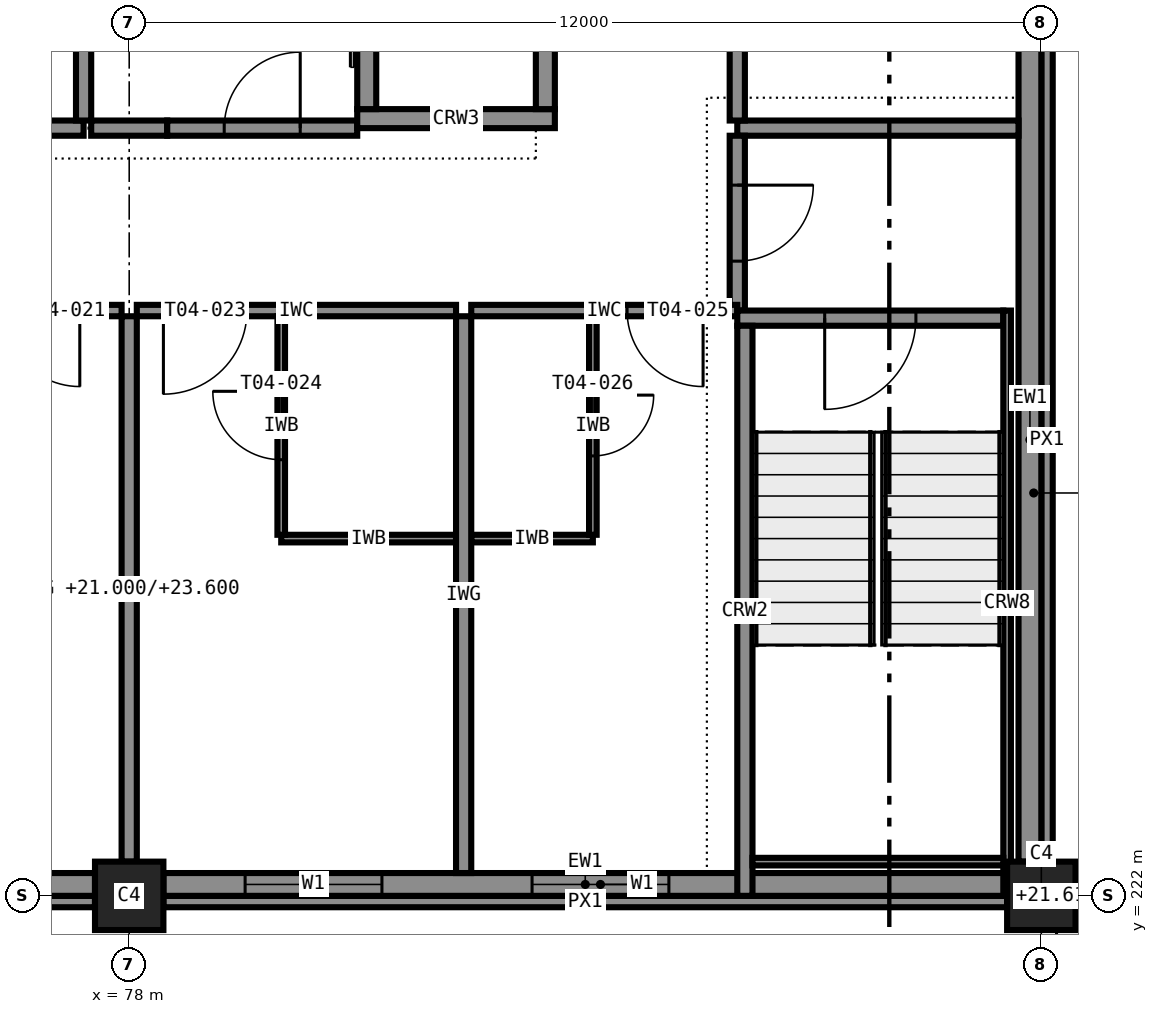
"""IFC4 building model, lengths in metres.
Left out: names, types, materials, properties, quantities, classifications, styles, units other than length and angle.
Written with IfcOpenShell. Run it as: python <this file> out.ifc"""

import sys

from ifc_helpers import new_model, si_unit, direction, frame, frame_2d, origin, origin_2d, place, context, subcontext, project, spatial, rectangle, extrude, element, fill, save


model = new_model("IFC4")
c1 = context("Model", 3, precision=1e-05, world=origin(), true_north=direction((0.0, 1.0)))
c2 = subcontext(c1, "Body", "Model", "MODEL_VIEW")
j1 = project(units=[si_unit("LENGTHUNIT", "METRE"), si_unit("PLANEANGLEUNIT", "RADIAN")], contexts=[c1])
p1 = place(None, origin())
s1 = spatial("IfcSite", under=j1, at=p1, CompositionType="ELEMENT")
p2 = place(p1, origin())
s2 = spatial("IfcBuilding", under=s1, at=p2, CompositionType="ELEMENT")
p3 = place(p2, frame((0.0, 0.0, 21.0)))
s3 = spatial("IfcBuildingStorey", under=s2, at=p3, CompositionType="ELEMENT", Elevation=21.0)
for number, where, z_axis, x_axis in (
    (1, (78.0, 222.0, 0.0), (0.0, 0.0, 1.0), (1.0, 0.0, 0.0)),
    (2, (90.0, 222.0, 0.0), (0.0, 0.0, 1.0), (1.0, 0.0, 0.0)),
):
    element("IfcColumn", number, at=place(p3, frame(where, z_axis=z_axis, x_axis=x_axis)), inside=s3, PredefinedType="COLUMN", context=c2, shape_type="SweptSolid", body=[
        extrude(rectangle(XDim=0.9, YDim=0.9, at=origin_2d()), origin(), (0.0, 0.0, 1.0), 3.6),
    ])
p4 = place(p3, frame((81.0, 232.225, 0.0), z_axis=(0.0, 0.0, 1.0), x_axis=(1.0, 0.0, 0.0)))
e3 = element("IfcWall", 3, at=p4, inside=s3, PredefinedType="SHEAR", context=c2, shape_type="SweptSolid", body=[
    extrude(rectangle(XDim=2.6, YDim=0.25, at=frame_2d((1.3, 0.0))), origin(), (0.0, 0.0, 1.0), 3.6),
])
p5 = place(p3, frame((81.125, 232.35, 0.0), z_axis=(0.0, 0.0, 1.0), x_axis=(0.0, 1.0, 0.0)))
e4 = element("IfcWall", 4, at=p5, inside=s3, PredefinedType="SHEAR", context=c2, shape_type="SweptSolid", body=[
    extrude(rectangle(XDim=3.3, YDim=0.25, at=frame_2d((1.65, 0.0))), origin(), (0.0, 0.0, 1.0), 3.6),
])
p6 = place(p5, frame((1.1, 0.0, 0.0)))
e5 = element("IfcOpeningElement", 5, at=p6, cuts=e4, PredefinedType="OPENING", context=c2, shape_type="SweptSolid", body=[
    extrude(rectangle(XDim=1.1, YDim=2.1, at=frame_2d((0.55, 1.05))), frame((0.0, 0.135, 0.0), z_axis=(0.0, -1.0, 0.0), x_axis=(1.0, 0.0, 0.0)), (0.0, 0.0, 1.0), 0.27),
])
p7 = place(p3, frame((83.475, 232.35, 0.0), z_axis=(0.0, 0.0, 1.0), x_axis=(0.0, 1.0, 0.0)))
e6 = element("IfcWall", 6, at=p7, inside=s3, PredefinedType="SHEAR", context=c2, shape_type="SweptSolid", body=[
    extrude(rectangle(XDim=3.3, YDim=0.25, at=frame_2d((1.65, 0.0))), origin(), (0.0, 0.0, 1.0), 3.6),
])
p8 = place(p3, frame((89.5, 229.6, 0.0), z_axis=(0.0, 0.0, 1.0), x_axis=(-1.0, 0.0, 0.0)))
e7 = element("IfcWall", 7, at=p8, inside=s3, PredefinedType="SHEAR", context=c2, shape_type="SweptSolid", body=[
    extrude(rectangle(XDim=3.5, YDim=0.2, at=frame_2d((1.75, 0.0))), origin(), (0.0, 0.0, 1.0), 3.6),
])
p9 = place(p8, frame((1.15, 0.0, 0.0)))
e8 = element("IfcOpeningElement", 8, at=p9, cuts=e7, PredefinedType="OPENING", context=c2, shape_type="SweptSolid", body=[
    extrude(rectangle(XDim=1.2, YDim=2.1, at=frame_2d((0.6, 1.05))), frame((0.0, 0.11, 0.0), z_axis=(0.0, -1.0, 0.0), x_axis=(1.0, 0.0, 0.0)), (0.0, 0.0, 1.0), 0.22),
])
p10 = place(p3, frame((86.1, 222.0, 0.0), z_axis=(0.0, 0.0, 1.0), x_axis=(0.0, 1.0, 0.0)))
e9 = element("IfcWall", 9, at=p10, inside=s3, PredefinedType="SHEAR", context=c2, shape_type="SweptSolid", body=[
    extrude(rectangle(XDim=7.5, YDim=0.2, at=frame_2d((3.75, 0.0))), origin(), (0.0, 0.0, 1.0), 3.6),
])
p11 = place(p3, frame((89.55, 229.7, 0.0), z_axis=(0.0, 0.0, 1.0), x_axis=(0.0, -1.0, 0.0)))
e10 = element("IfcWall", 10, at=p11, inside=s3, PredefinedType="SHEAR", context=c2, shape_type="SweptSolid", body=[
    extrude(rectangle(XDim=7.7, YDim=0.1, at=frame_2d((3.85, 0.0))), origin(), (0.0, 0.0, 1.0), 3.4),
])
p12 = place(p3, frame((89.5, 222.45, 0.0), z_axis=(0.0, 0.0, 1.0), x_axis=(-1.0, 0.0, 0.0)))
e11 = element("IfcWall", 11, at=p12, inside=s3, PredefinedType="SHEAR", context=c2, shape_type="SweptSolid", body=[
    extrude(rectangle(XDim=3.3, YDim=0.1, at=frame_2d((1.65, 0.0))), origin(), (0.0, 0.0, 1.0), 3.4),
])
p13 = place(p3, frame((66.45, 222.15, 0.0), z_axis=(0.0, 0.0, 1.0), x_axis=(1.0, 0.0, 0.0)))
e12 = element("IfcWall", 12, at=p13, inside=s3, PredefinedType="STANDARD", context=c2, shape_type="SweptSolid", body=[
    extrude(rectangle(XDim=11.1, YDim=0.3, at=frame_2d((5.55, 0.0))), origin(), (0.0, 0.0, 1.0), 2.6),
])
p14 = place(p13, frame((0.875, 0.0, 0.85)))
e13 = element("IfcOpeningElement", 13, at=p14, cuts=e12, PredefinedType="OPENING", context=c2, shape_type="SweptSolid", body=[
    extrude(rectangle(XDim=1.8, YDim=1.75, at=frame_2d((0.9, 0.875))), frame((0.0, 0.16, 0.0), z_axis=(0.0, -1.0, 0.0), x_axis=(1.0, 0.0, 0.0)), (0.0, 0.0, 1.0), 0.32),
])
p15 = place(p13, frame((4.65, 0.0, 0.85)))
e14 = element("IfcOpeningElement", 14, at=p15, cuts=e12, PredefinedType="OPENING", context=c2, shape_type="SweptSolid", body=[
    extrude(rectangle(XDim=1.8, YDim=1.75, at=frame_2d((0.9, 0.875))), frame((0.0, 0.16, 0.0), z_axis=(0.0, -1.0, 0.0), x_axis=(1.0, 0.0, 0.0)), (0.0, 0.0, 1.0), 0.32),
])
p16 = place(p13, frame((8.425, 0.0, 0.85)))
e15 = element("IfcOpeningElement", 15, at=p16, cuts=e12, PredefinedType="OPENING", context=c2, shape_type="SweptSolid", body=[
    extrude(rectangle(XDim=1.8, YDim=1.75, at=frame_2d((0.9, 0.875))), frame((0.0, 0.16, 0.0), z_axis=(0.0, -1.0, 0.0), x_axis=(1.0, 0.0, 0.0)), (0.0, 0.0, 1.0), 0.32),
])
p17 = place(p3, frame((78.45, 222.15, 0.0), z_axis=(0.0, 0.0, 1.0), x_axis=(1.0, 0.0, 0.0)))
e16 = element("IfcWall", 16, at=p17, inside=s3, PredefinedType="STANDARD", context=c2, shape_type="SweptSolid", body=[
    extrude(rectangle(XDim=11.1, YDim=0.3, at=frame_2d((5.55, 0.0))), origin(), (0.0, 0.0, 1.0), 2.6),
])
p18 = place(p17, frame((1.075, 0.0, 0.85)))
e17 = element("IfcOpeningElement", 17, at=p18, cuts=e16, PredefinedType="OPENING", context=c2, shape_type="SweptSolid", body=[
    extrude(rectangle(XDim=1.8, YDim=1.75, at=frame_2d((0.9, 0.875))), frame((0.0, 0.16, 0.0), z_axis=(0.0, -1.0, 0.0), x_axis=(1.0, 0.0, 0.0)), (0.0, 0.0, 1.0), 0.32),
])
p19 = place(p17, frame((4.85, 0.0, 0.85)))
e18 = element("IfcOpeningElement", 18, at=p19, cuts=e16, PredefinedType="OPENING", context=c2, shape_type="SweptSolid", body=[
    extrude(rectangle(XDim=1.8, YDim=1.75, at=frame_2d((0.9, 0.875))), frame((0.0, 0.16, 0.0), z_axis=(0.0, -1.0, 0.0), x_axis=(1.0, 0.0, 0.0)), (0.0, 0.0, 1.0), 0.32),
])
for number, where, z_axis, x_axis in (
    (19, (66.45, 221.925, 3.4), (0.0, 0.0, 1.0), (1.0, 0.0, 0.0)),
    (20, (78.45, 221.925, 3.4), (0.0, 0.0, 1.0), (1.0, 0.0, 0.0)),
):
    element("IfcWall", number, at=place(p3, frame(where, z_axis=z_axis, x_axis=x_axis)), inside=s3, PredefinedType="STANDARD", context=c2, shape_type="SweptSolid", body=[
        extrude(rectangle(XDim=11.1, YDim=0.15, at=frame_2d((5.55, 0.0))), origin(), (0.0, 0.0, 1.0), 0.2),
    ])
p20 = place(p3, frame((89.85, 222.45, 0.0), z_axis=(0.0, 0.0, 1.0), x_axis=(0.0, 1.0, 0.0)))
e21 = element("IfcWall", 21, at=p20, inside=s3, PredefinedType="STANDARD", context=c2, shape_type="SweptSolid", body=[
    extrude(rectangle(XDim=11.1, YDim=0.3, at=frame_2d((5.55, 0.0))), origin(), (0.0, 0.0, 1.0), 2.6),
])
p21 = place(p3, frame((90.075, 222.45, 3.4), z_axis=(0.0, 0.0, 1.0), x_axis=(0.0, 1.0, 0.0)))
e22 = element("IfcWall", 22, at=p21, inside=s3, PredefinedType="STANDARD", context=c2, shape_type="SweptSolid", body=[
    extrude(rectangle(XDim=11.1, YDim=0.15, at=frame_2d((5.55, 0.0))), origin(), (0.0, 0.0, 1.0), 0.2),
])
p22 = place(p3, frame((75.5, 232.1, 0.0), z_axis=(0.0, 0.0, 1.0), x_axis=(1.0, 0.0, 0.0)))
e23 = element("IfcWall", 23, at=p22, inside=s3, PredefinedType="PARTITIONING", context=c2, shape_type="SweptSolid", body=[
    extrude(rectangle(XDim=1.9, YDim=0.2, at=frame_2d((0.95, 0.0))), origin(), (0.0, 0.0, 1.0), 3.4),
])
p23 = place(p3, frame((77.5, 232.1, 0.0), z_axis=(0.0, 0.0, 1.0), x_axis=(1.0, 0.0, 0.0)))
e24 = element("IfcWall", 24, at=p23, inside=s3, PredefinedType="PARTITIONING", context=c2, shape_type="SweptSolid", body=[
    extrude(rectangle(XDim=1.0, YDim=0.2, at=frame_2d((0.5, 0.0))), origin(), (0.0, 0.0, 1.0), 3.4),
])
p24 = place(p3, frame((78.5, 232.1, 0.0), z_axis=(0.0, 0.0, 1.0), x_axis=(1.0, 0.0, 0.0)))
e25 = element("IfcWall", 25, at=p24, inside=s3, PredefinedType="PARTITIONING", context=c2, shape_type="SweptSolid", body=[
    extrude(rectangle(XDim=2.5, YDim=0.2, at=frame_2d((1.25, 0.0))), origin(), (0.0, 0.0, 1.0), 3.4),
])
p25 = place(p24, frame((0.75, 0.0, 0.0)))
e26 = element("IfcOpeningElement", 26, at=p25, cuts=e25, PredefinedType="OPENING", context=c2, shape_type="SweptSolid", body=[
    extrude(rectangle(XDim=1.0, YDim=2.1, at=frame_2d((0.5, 1.05))), frame((0.0, 0.11, 0.0), z_axis=(0.0, -1.0, 0.0), x_axis=(1.0, 0.0, 0.0)), (0.0, 0.0, 1.0), 0.22),
])
p26 = place(p3, frame((86.0, 232.1, 0.0), z_axis=(0.0, 0.0, 1.0), x_axis=(1.0, 0.0, 0.0)))
e27 = element("IfcWall", 27, at=p26, inside=s3, PredefinedType="PARTITIONING", context=c2, shape_type="SweptSolid", body=[
    extrude(rectangle(XDim=3.7, YDim=0.2, at=frame_2d((1.85, 0.0))), origin(), (0.0, 0.0, 1.0), 3.4),
])
p27 = place(p3, frame((77.4, 232.2, 0.0), z_axis=(0.0, 0.0, 1.0), x_axis=(0.0, 1.0, 0.0)))
e28 = element("IfcWall", 28, at=p27, inside=s3, PredefinedType="PARTITIONING", context=c2, shape_type="SweptSolid", body=[
    extrude(rectangle(XDim=3.6, YDim=0.2, at=frame_2d((1.8, 0.0))), origin(), (0.0, 0.0, 1.0), 3.4),
])
p28 = place(p3, frame((86.0, 235.8, 0.0), z_axis=(0.0, 0.0, 1.0), x_axis=(0.0, -1.0, 0.0)))
e29 = element("IfcWall", 29, at=p28, inside=s3, PredefinedType="PARTITIONING", context=c2, shape_type="SweptSolid", body=[
    extrude(rectangle(XDim=3.6, YDim=0.2, at=frame_2d((1.8, 0.0))), origin(), (0.0, 0.0, 1.0), 3.4),
])
p29 = place(p28, frame((1.35, 0.0, 0.0)))
e30 = element("IfcOpeningElement", 30, at=p29, cuts=e29, PredefinedType="OPENING", context=c2, shape_type="SweptSolid", body=[
    extrude(rectangle(XDim=0.9, YDim=2.1, at=frame_2d((0.45, 1.05))), frame((0.0, 0.11, 0.0), z_axis=(0.0, -1.0, 0.0), x_axis=(1.0, 0.0, 0.0)), (0.0, 0.0, 1.0), 0.22),
])
p30 = place(p3, frame((86.0, 232.0, 0.0), z_axis=(0.0, 0.0, 1.0), x_axis=(0.0, -1.0, 0.0)))
e31 = element("IfcWall", 31, at=p30, inside=s3, PredefinedType="PARTITIONING", context=c2, shape_type="SweptSolid", body=[
    extrude(rectangle(XDim=2.3, YDim=0.2, at=frame_2d((1.15, 0.0))), origin(), (0.0, 0.0, 1.0), 3.4),
])
p31 = place(p30, frame((0.65, 0.0, 0.0)))
e32 = element("IfcOpeningElement", 32, at=p31, cuts=e31, PredefinedType="OPENING", context=c2, shape_type="SweptSolid", body=[
    extrude(rectangle(XDim=1.0, YDim=2.1, at=frame_2d((0.5, 1.05))), frame((0.0, 0.11, 0.0), z_axis=(0.0, -1.0, 0.0), x_axis=(1.0, 0.0, 0.0)), (0.0, 0.0, 1.0), 0.22),
])
p32 = place(p3, frame((77.9, 229.7, 0.0), z_axis=(0.0, 0.0, 1.0), x_axis=(-1.0, 0.0, 0.0)))
e33 = element("IfcWall", 33, at=p32, inside=s3, PredefinedType="PARTITIONING", context=c2, shape_type="SweptSolid", body=[
    extrude(rectangle(XDim=3.8, YDim=0.15, at=frame_2d((1.9, 0.0))), origin(), (0.0, 0.0, 1.0), 3.4),
])
p33 = place(p32, frame((0.55, 0.0, 0.0)))
e34 = element("IfcOpeningElement", 34, at=p33, cuts=e33, PredefinedType="OPENING", context=c2, shape_type="SweptSolid", body=[
    extrude(rectangle(XDim=1.0, YDim=2.1, at=frame_2d((0.5, 1.05))), frame((0.0, 0.085, 0.0), z_axis=(0.0, -1.0, 0.0), x_axis=(1.0, 0.0, 0.0)), (0.0, 0.0, 1.0), 0.17),
])
p34 = place(p3, frame((82.3, 229.7, 0.0), z_axis=(0.0, 0.0, 1.0), x_axis=(-1.0, 0.0, 0.0)))
e35 = element("IfcWall", 35, at=p34, inside=s3, PredefinedType="PARTITIONING", context=c2, shape_type="SweptSolid", body=[
    extrude(rectangle(XDim=4.2, YDim=0.15, at=frame_2d((2.1, 0.0))), origin(), (0.0, 0.0, 1.0), 3.4),
])
p35 = place(p34, frame((2.75, 0.0, 0.0)))
e36 = element("IfcOpeningElement", 36, at=p35, cuts=e35, PredefinedType="OPENING", context=c2, shape_type="SweptSolid", body=[
    extrude(rectangle(XDim=1.1, YDim=2.1, at=frame_2d((0.55, 1.05))), frame((0.0, 0.085, 0.0), z_axis=(0.0, -1.0, 0.0), x_axis=(1.0, 0.0, 0.0)), (0.0, 0.0, 1.0), 0.17),
])
p36 = place(p3, frame((80.0, 226.7, 0.0), z_axis=(0.0, 0.0, 1.0), x_axis=(1.0, 0.0, 0.0)))
e37 = element("IfcWall", 37, at=p36, inside=s3, PredefinedType="PARTITIONING", context=c2, shape_type="SweptSolid", body=[
    extrude(rectangle(XDim=2.3, YDim=0.1, at=frame_2d((1.15, 0.0))), origin(), (0.0, 0.0, 1.0), 3.4),
])
p37 = place(p3, frame((80.0, 226.75, 0.0), z_axis=(0.0, 0.0, 1.0), x_axis=(0.0, 1.0, 0.0)))
e38 = element("IfcWall", 38, at=p37, inside=s3, PredefinedType="PARTITIONING", context=c2, shape_type="SweptSolid", body=[
    extrude(rectangle(XDim=2.875, YDim=0.1, at=frame_2d((1.438, 0.0))), origin(), (0.0, 0.0, 1.0), 3.4),
])
p38 = place(p37, frame((0.988, 0.0, 0.0)))
e39 = element("IfcOpeningElement", 39, at=p38, cuts=e38, PredefinedType="OPENING", context=c2, shape_type="SweptSolid", body=[
    extrude(rectangle(XDim=0.9, YDim=2.1, at=frame_2d((0.45, 1.05))), frame((0.0, 0.06, 0.0), z_axis=(0.0, -1.0, 0.0), x_axis=(1.0, 0.0, 0.0)), (0.0, 0.0, 1.0), 0.12),
])
p39 = place(p3, frame((86.0, 229.7, 0.0), z_axis=(0.0, 0.0, 1.0), x_axis=(-1.0, 0.0, 0.0)))
e40 = element("IfcWall", 40, at=p39, inside=s3, PredefinedType="PARTITIONING", context=c2, shape_type="SweptSolid", body=[
    extrude(rectangle(XDim=3.5, YDim=0.15, at=frame_2d((1.75, 0.0))), origin(), (0.0, 0.0, 1.0), 3.4),
])
p40 = place(p39, frame((0.45, 0.0, 0.0)))
e41 = element("IfcOpeningElement", 41, at=p40, cuts=e40, PredefinedType="OPENING", context=c2, shape_type="SweptSolid", body=[
    extrude(rectangle(XDim=1.0, YDim=2.1, at=frame_2d((0.5, 1.05))), frame((0.0, 0.085, 0.0), z_axis=(0.0, -1.0, 0.0), x_axis=(1.0, 0.0, 0.0)), (0.0, 0.0, 1.0), 0.17),
])
p41 = place(p3, frame((82.5, 226.7, 0.0), z_axis=(0.0, 0.0, 1.0), x_axis=(1.0, 0.0, 0.0)))
e42 = element("IfcWall", 42, at=p41, inside=s3, PredefinedType="PARTITIONING", context=c2, shape_type="SweptSolid", body=[
    extrude(rectangle(XDim=1.6, YDim=0.1, at=frame_2d((0.8, 0.0))), origin(), (0.0, 0.0, 1.0), 3.4),
])
p42 = place(p3, frame((84.1, 229.625, 0.0), z_axis=(0.0, 0.0, 1.0), x_axis=(0.0, -1.0, 0.0)))
e43 = element("IfcWall", 43, at=p42, inside=s3, PredefinedType="PARTITIONING", context=c2, shape_type="SweptSolid", body=[
    extrude(rectangle(XDim=2.875, YDim=0.1, at=frame_2d((1.438, 0.0))), origin(), (0.0, 0.0, 1.0), 3.4),
])
p43 = place(p42, frame((1.038, 0.0, 0.0)))
e44 = element("IfcOpeningElement", 44, at=p43, cuts=e43, PredefinedType="OPENING", context=c2, shape_type="SweptSolid", body=[
    extrude(rectangle(XDim=0.8, YDim=2.1, at=frame_2d((0.4, 1.05))), frame((0.0, 0.06, 0.0), z_axis=(0.0, -1.0, 0.0), x_axis=(1.0, 0.0, 0.0)), (0.0, 0.0, 1.0), 0.12),
])
p44 = place(p3, frame((78.0, 222.45, 0.0), z_axis=(0.0, 0.0, 1.0), x_axis=(0.0, 1.0, 0.0)))
e45 = element("IfcWall", 45, at=p44, inside=s3, PredefinedType="PARTITIONING", context=c2, shape_type="SweptSolid", body=[
    extrude(rectangle(XDim=7.175, YDim=0.2, at=frame_2d((3.587, 0.0))), origin(), (0.0, 0.0, 1.0), 2.6),
])
p45 = place(p3, frame((82.4, 222.3, 0.0), z_axis=(0.0, 0.0, 1.0), x_axis=(0.0, 1.0, 0.0)))
e46 = element("IfcWall", 46, at=p45, inside=s3, PredefinedType="PARTITIONING", context=c2, shape_type="SweptSolid", body=[
    extrude(rectangle(XDim=7.325, YDim=0.2, at=frame_2d((3.663, 0.0))), origin(), (0.0, 0.0, 1.0), 3.4),
])
p46 = place(p18, origin())
e47 = element("IfcWindow", 47, at=p46, inside=s3, PartitioningType="SINGLE_PANEL", PredefinedType="WINDOW", context=c2, shape_type="SweptSolid", body=[
    extrude(rectangle(XDim=1.8, YDim=1.75, at=frame_2d((0.9, 0.875))), frame((0.0, 0.03, 0.0), z_axis=(0.0, -1.0, 0.0), x_axis=(1.0, 0.0, 0.0)), (0.0, 0.0, 1.0), 0.06),
])
fill(e17, e47)
p47 = place(p19, origin())
e48 = element("IfcWindow", 48, at=p47, inside=s3, PartitioningType="SINGLE_PANEL", PredefinedType="WINDOW", context=c2, shape_type="SweptSolid", body=[
    extrude(rectangle(XDim=1.8, YDim=1.75, at=frame_2d((0.9, 0.875))), frame((0.0, 0.03, 0.0), z_axis=(0.0, -1.0, 0.0), x_axis=(1.0, 0.0, 0.0)), (0.0, 0.0, 1.0), 0.06),
])
fill(e18, e48)
p48 = place(p25, origin())
e49 = element("IfcDoor", 49, at=p48, inside=s3, OperationType="SINGLE_SWING_RIGHT", PredefinedType="DOOR", context=c2, shape_type="SweptSolid", body=[
    extrude(rectangle(XDim=1.0, YDim=2.1, at=frame_2d((0.5, 1.05))), frame((0.0, 0.025, 0.0), z_axis=(0.0, -1.0, 0.0), x_axis=(1.0, 0.0, 0.0)), (0.0, 0.0, 1.0), 0.05),
])
fill(e26, e49)
p49 = place(p31, origin())
e50 = element("IfcDoor", 50, at=p49, inside=s3, OperationType="SINGLE_SWING_LEFT", PredefinedType="DOOR", context=c2, shape_type="SweptSolid", body=[
    extrude(rectangle(XDim=1.0, YDim=2.1, at=frame_2d((0.5, 1.05))), frame((0.0, 0.025, 0.0), z_axis=(0.0, -1.0, 0.0), x_axis=(1.0, 0.0, 0.0)), (0.0, 0.0, 1.0), 0.05),
])
fill(e32, e50)
p50 = place(p33, origin())
e51 = element("IfcDoor", 51, at=p50, inside=s3, OperationType="SINGLE_SWING_LEFT", PredefinedType="DOOR", context=c2, shape_type="SweptSolid", body=[
    extrude(rectangle(XDim=1.0, YDim=2.1, at=frame_2d((0.5, 1.05))), frame((0.0, 0.025, 0.0), z_axis=(0.0, -1.0, 0.0), x_axis=(1.0, 0.0, 0.0)), (0.0, 0.0, 1.0), 0.05),
])
fill(e34, e51)
p51 = place(p35, origin())
e52 = element("IfcDoor", 52, at=p51, inside=s3, OperationType="SINGLE_SWING_RIGHT", PredefinedType="DOOR", context=c2, shape_type="SweptSolid", body=[
    extrude(rectangle(XDim=1.1, YDim=2.1, at=frame_2d((0.55, 1.05))), frame((0.0, 0.025, 0.0), z_axis=(0.0, -1.0, 0.0), x_axis=(1.0, 0.0, 0.0)), (0.0, 0.0, 1.0), 0.05),
])
fill(e36, e52)
p52 = place(p38, origin())
e53 = element("IfcDoor", 53, at=p52, inside=s3, OperationType="SINGLE_SWING_RIGHT", PredefinedType="DOOR", context=c2, shape_type="SweptSolid", body=[
    extrude(rectangle(XDim=0.9, YDim=2.1, at=frame_2d((0.45, 1.05))), frame((0.0, 0.025, 0.0), z_axis=(0.0, -1.0, 0.0), x_axis=(1.0, 0.0, 0.0)), (0.0, 0.0, 1.0), 0.05),
])
fill(e39, e53)
p53 = place(p40, origin())
e54 = element("IfcDoor", 54, at=p53, inside=s3, OperationType="SINGLE_SWING_LEFT", PredefinedType="DOOR", context=c2, shape_type="SweptSolid", body=[
    extrude(rectangle(XDim=1.0, YDim=2.1, at=frame_2d((0.5, 1.05))), frame((0.0, 0.025, 0.0), z_axis=(0.0, -1.0, 0.0), x_axis=(1.0, 0.0, 0.0)), (0.0, 0.0, 1.0), 0.05),
])
fill(e41, e54)
p54 = place(p43, origin())
e55 = element("IfcDoor", 55, at=p54, inside=s3, OperationType="SINGLE_SWING_LEFT", PredefinedType="DOOR", context=c2, shape_type="SweptSolid", body=[
    extrude(rectangle(XDim=0.8, YDim=2.1, at=frame_2d((0.4, 1.05))), frame((0.0, 0.025, 0.0), z_axis=(0.0, -1.0, 0.0), x_axis=(1.0, 0.0, 0.0)), (0.0, 0.0, 1.0), 0.05),
])
fill(e44, e55)
p55 = place(p9, origin())
e56 = element("IfcDoor", 56, at=p55, inside=s3, OperationType="SINGLE_SWING_RIGHT", PredefinedType="DOOR", context=c2, shape_type="SweptSolid", body=[
    extrude(rectangle(XDim=1.2, YDim=2.1, at=frame_2d((0.6, 1.05))), frame((0.0, 0.025, 0.0), z_axis=(0.0, -1.0, 0.0), x_axis=(1.0, 0.0, 0.0)), (0.0, 0.0, 1.0), 0.05),
])
fill(e8, e56)
save(model, sys.argv[1])
